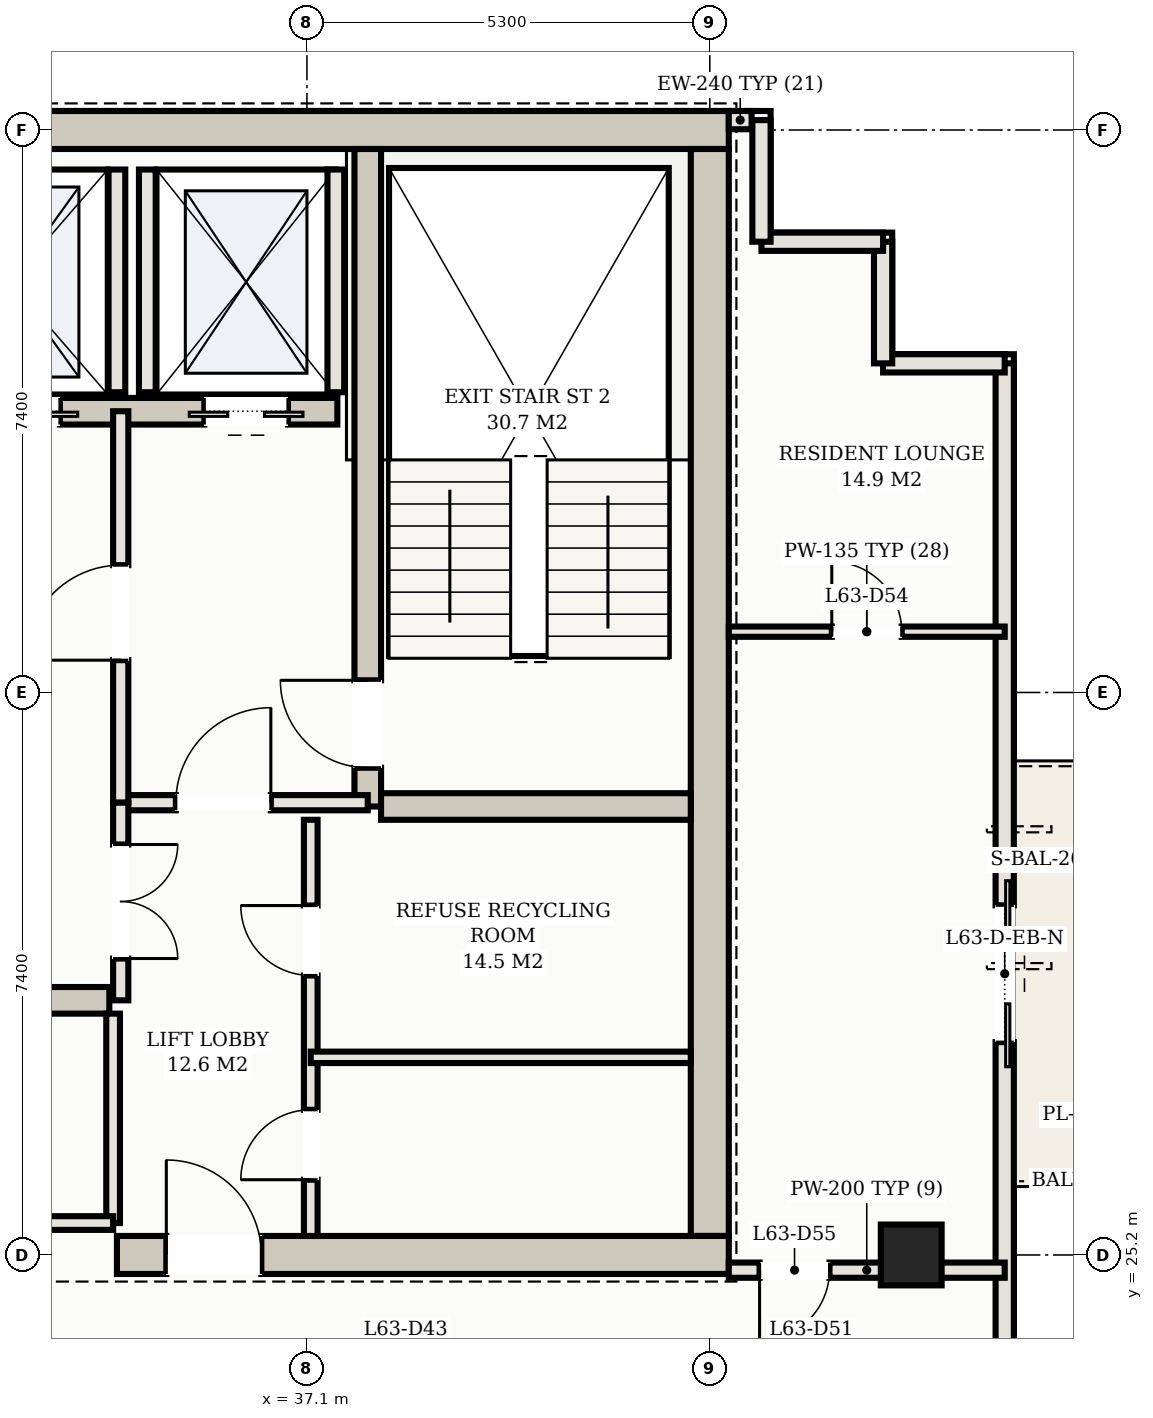
"""IFC4 building model, lengths in metres.
Left out: names, types, materials, properties, quantities, classifications, styles, units other than length and angle.
Written with IfcOpenShell. Run it as: python <this file> out.ifc"""

import sys

from ifc_helpers import new_model, si_unit, direction, frame, frame_2d, origin, origin_2d, place, context, subcontext, project, spatial, rectangle, hollow_rectangle, extrude, element, fill, save


model = new_model("IFC4")
c1 = context("Model", 3, precision=1e-05, world=origin(), true_north=direction((0.0, 1.0)))
c2 = subcontext(c1, "Body", "Model", "MODEL_VIEW")
j1 = project(units=[si_unit("LENGTHUNIT", "METRE"), si_unit("PLANEANGLEUNIT", "RADIAN")], contexts=[c1])
p1 = place(None, origin())
s1 = spatial("IfcSite", under=j1, at=p1, CompositionType="ELEMENT")
p2 = place(p1, origin())
s2 = spatial("IfcBuilding", under=s1, at=p2, CompositionType="ELEMENT")
p3 = place(p2, frame((0.0, 0.0, 229.7)))
s3 = spatial("IfcBuildingStorey", under=s2, at=p3, CompositionType="ELEMENT", Elevation=229.7)
p4 = place(p3, frame((10.35, 40.0, 0.0), z_axis=(0.0, 0.0, 1.0), x_axis=(1.0, 0.0, 0.0)))
e1 = element("IfcWall", 1, at=p4, inside=s3, PredefinedType="SHEAR", context=c2, shape_type="SweptSolid", body=[
    extrude(rectangle(XDim=32.3, YDim=0.5, at=frame_2d((16.15, 0.0))), origin(), (0.0, 0.0, 1.0), 3.11),
])
p5 = place(p3, frame((42.4, 25.45, 0.0), z_axis=(0.0, 0.0, 1.0), x_axis=(0.0, 1.0, 0.0)))
e2 = element("IfcWall", 2, at=p5, inside=s3, PredefinedType="SHEAR", context=c2, shape_type="SweptSolid", body=[
    extrude(rectangle(XDim=14.3, YDim=0.5, at=frame_2d((7.15, 0.0))), origin(), (0.0, 0.0, 1.0), 3.11),
])
p6 = place(p3, frame((34.6, 25.2, 0.0), z_axis=(0.0, 0.0, 1.0), x_axis=(1.0, 0.0, 0.0)))
e3 = element("IfcWall", 3, at=p6, inside=s3, PredefinedType="SHEAR", context=c2, shape_type="SweptSolid", body=[
    extrude(rectangle(XDim=8.05, YDim=0.5, at=frame_2d((4.025, 0.0))), origin(), (0.0, 0.0, 1.0), 3.11),
])
p7 = place(p6, frame((0.65, 0.0, 0.0)))
e4 = element("IfcOpeningElement", 4, at=p7, cuts=e3, PredefinedType="OPENING", context=c2, shape_type="SweptSolid", body=[
    extrude(rectangle(XDim=1.25, YDim=2.2, at=frame_2d((0.625, 1.1))), frame((0.0, 0.26, 0.0), z_axis=(0.0, -1.0, 0.0), x_axis=(1.0, 0.0, 0.0)), (0.0, 0.0, 1.0), 0.52),
])
p8 = place(p3, frame((37.9, 31.1, 0.0), z_axis=(0.0, 0.0, 1.0), x_axis=(0.0, 1.0, 0.0)))
e5 = element("IfcWall", 5, at=p8, inside=s3, PredefinedType="SHEAR", context=c2, shape_type="SweptSolid", body=[
    extrude(rectangle(XDim=8.65, YDim=0.35, at=frame_2d((4.325, 0.0))), origin(), (0.0, 0.0, 1.0), 3.11),
])
p9 = place(p8, frame((0.51, 0.0, 0.0)))
e6 = element("IfcOpeningElement", 6, at=p9, cuts=e5, PredefinedType="OPENING", context=c2, shape_type="SweptSolid", body=[
    extrude(rectangle(XDim=1.15, YDim=2.2, at=frame_2d((0.575, 1.1))), frame((0.0, 0.185, 0.0), z_axis=(0.0, -1.0, 0.0), x_axis=(1.0, 0.0, 0.0)), (0.0, 0.0, 1.0), 0.37),
])
p10 = place(p3, frame((38.075, 31.1, 0.0), z_axis=(0.0, 0.0, 1.0), x_axis=(1.0, 0.0, 0.0)))
e7 = element("IfcWall", 7, at=p10, inside=s3, PredefinedType="SHEAR", context=c2, shape_type="SweptSolid", body=[
    extrude(rectangle(XDim=4.075, YDim=0.35, at=frame_2d((2.038, 0.0))), origin(), (0.0, 0.0, 1.0), 3.11),
])
p11 = place(p3, frame((15.5, 36.3, 0.0), z_axis=(0.0, 0.0, 1.0), x_axis=(1.0, 0.0, 0.0)))
e8 = element("IfcWall", 8, at=p11, inside=s3, PredefinedType="SHEAR", context=c2, shape_type="SweptSolid", body=[
    extrude(rectangle(XDim=22.0, YDim=0.35, at=frame_2d((11.0, 0.0))), origin(), (0.0, 0.0, 1.0), 3.11),
])
p12 = place(p11, frame((0.65, 0.0, 0.0)))
e9 = element("IfcOpeningElement", 9, at=p12, cuts=e8, PredefinedType="OPENING", context=c2, shape_type="SweptSolid", body=[
    extrude(rectangle(XDim=1.1, YDim=2.15, at=frame_2d((0.55, 1.075))), frame((0.0, 0.185, 0.0), z_axis=(0.0, -1.0, 0.0), x_axis=(1.0, 0.0, 0.0)), (0.0, 0.0, 1.0), 0.37),
])
p13 = place(p11, frame((20.25, 0.0, 0.0)))
e10 = element("IfcOpeningElement", 10, at=p13, cuts=e8, PredefinedType="OPENING", context=c2, shape_type="SweptSolid", body=[
    extrude(rectangle(XDim=1.1, YDim=2.15, at=frame_2d((0.55, 1.075))), frame((0.0, 0.185, 0.0), z_axis=(0.0, -1.0, 0.0), x_axis=(1.0, 0.0, 0.0)), (0.0, 0.0, 1.0), 0.37),
])
p14 = place(p11, frame((17.05, 0.0, 0.0)))
e11 = element("IfcOpeningElement", 11, at=p14, cuts=e8, PredefinedType="OPENING", context=c2, shape_type="SweptSolid", body=[
    extrude(rectangle(XDim=1.3, YDim=2.2, at=frame_2d((0.65, 1.1))), frame((0.0, 0.185, 0.0), z_axis=(0.0, -1.0, 0.0), x_axis=(1.0, 0.0, 0.0)), (0.0, 0.0, 1.0), 0.37),
])
p15 = place(p11, frame((3.95, 0.0, 0.0)))
e12 = element("IfcOpeningElement", 12, at=p15, cuts=e8, PredefinedType="OPENING", context=c2, shape_type="SweptSolid", body=[
    extrude(rectangle(XDim=1.1, YDim=2.15, at=frame_2d((0.55, 1.075))), frame((0.0, 0.185, 0.0), z_axis=(0.0, -1.0, 0.0), x_axis=(1.0, 0.0, 0.0)), (0.0, 0.0, 1.0), 0.37),
])
p16 = place(p11, frame((6.55, 0.0, 0.0)))
e13 = element("IfcOpeningElement", 13, at=p16, cuts=e8, PredefinedType="OPENING", context=c2, shape_type="SweptSolid", body=[
    extrude(rectangle(XDim=1.1, YDim=2.15, at=frame_2d((0.55, 1.075))), frame((0.0, 0.185, 0.0), z_axis=(0.0, -1.0, 0.0), x_axis=(1.0, 0.0, 0.0)), (0.0, 0.0, 1.0), 0.37),
])
p17 = place(p11, frame((9.15, 0.0, 0.0)))
e14 = element("IfcOpeningElement", 14, at=p17, cuts=e8, PredefinedType="OPENING", context=c2, shape_type="SweptSolid", body=[
    extrude(rectangle(XDim=1.1, YDim=2.15, at=frame_2d((0.55, 1.075))), frame((0.0, 0.185, 0.0), z_axis=(0.0, -1.0, 0.0), x_axis=(1.0, 0.0, 0.0)), (0.0, 0.0, 1.0), 0.37),
])
p18 = place(p3, frame((18.5, 28.55, 0.0), z_axis=(0.0, 0.0, 1.0), x_axis=(1.0, 0.0, 0.0)))
e15 = element("IfcWall", 15, at=p18, inside=s3, PredefinedType="SHEAR", context=c2, shape_type="SweptSolid", body=[
    extrude(rectangle(XDim=16.0, YDim=0.35, at=frame_2d((8.0, 0.0))), origin(), (0.0, 0.0, 1.0), 3.11),
])
p19 = place(p3, frame((45.05, 25.2, 0.0), z_axis=(0.0, 0.0, 1.0), x_axis=(1.0, 0.0, 0.0)))
e16 = element("IfcColumn", 16, at=p19, inside=s3, PredefinedType="COLUMN", context=c2, shape_type="SweptSolid", body=[
    extrude(hollow_rectangle(XDim=0.8, YDim=0.8, WallThickness=0.028, at=origin_2d()), origin(), (0.0, 0.0, 1.0), 3.264),
])
for number, where, z_axis, x_axis in (
    (17, (35.0, 36.55, 0.0), (0.0, 0.0, 1.0), (0.0, 1.0, 0.0)),
    (18, (37.48, 36.55, 0.0), (0.0, 0.0, 1.0), (0.0, 1.0, 0.0)),
    (19, (34.6, 36.55, 0.0), (0.0, 0.0, 1.0), (0.0, 1.0, 0.0)),
):
    element("IfcWall", number, at=place(p3, frame(where, z_axis=z_axis, x_axis=x_axis)), inside=s3, PredefinedType="SOLIDWALL", context=c2, shape_type="SweptSolid", body=[
        extrude(rectangle(XDim=2.93, YDim=0.22, at=frame_2d((1.465, 0.0))), origin(), (0.0, 0.0, 1.0), 3.11),
    ])
p20 = place(p3, frame((46.28, 10.52, 0.0), z_axis=(0.0, 0.0, 1.0), x_axis=(0.0, 1.0, 0.0)))
e20 = element("IfcWall", 20, at=p20, inside=s3, PredefinedType="SOLIDWALL", context=c2, shape_type="SweptSolid", body=[
    extrude(rectangle(XDim=26.41, YDim=0.24, at=frame_2d((13.205, 0.0))), origin(), (0.0, 0.0, 1.0), 3.11),
])
p21 = place(p20, frame((17.48, 0.0, 0.0)))
e21 = element("IfcOpeningElement", 21, at=p21, cuts=e20, PredefinedType="OPENING", context=c2, shape_type="SweptSolid", body=[
    extrude(rectangle(XDim=1.8, YDim=2.2, at=frame_2d((0.9, 1.1))), frame((0.0, 0.13, 0.0), z_axis=(0.0, -1.0, 0.0), x_axis=(1.0, 0.0, 0.0)), (0.0, 0.0, 1.0), 0.26),
])
for number, where, z_axis, x_axis in (
    (22, (46.28, 36.93, 0.0), (0.0, 0.0, 1.0), (-1.0, 0.0, 0.0)),
    (23, (44.68, 36.93, 0.0), (0.0, 0.0, 1.0), (0.0, 1.0, 0.0)),
):
    element("IfcWall", number, at=place(p3, frame(where, z_axis=z_axis, x_axis=x_axis)), inside=s3, PredefinedType="SOLIDWALL", context=c2, shape_type="SweptSolid", body=[
        extrude(rectangle(XDim=1.6, YDim=0.24, at=frame_2d((0.8, 0.0))), origin(), (0.0, 0.0, 1.0), 3.11),
    ])
for number, where, z_axis, x_axis in (
    (24, (44.68, 38.53, 0.0), (0.0, 0.0, 1.0), (-1.0, 0.0, 0.0)),
    (25, (43.08, 38.53, 0.0), (0.0, 0.0, 1.0), (0.0, 1.0, 0.0)),
):
    element("IfcWall", number, at=place(p3, frame(where, z_axis=z_axis, x_axis=x_axis)), inside=s3, PredefinedType="SOLIDWALL", context=c2, shape_type="SweptSolid", body=[
        extrude(rectangle(XDim=1.6, YDim=0.24, at=frame_2d((0.8, 0.0))), origin(), (0.0, 0.0, 1.0), 3.11),
    ])
p22 = place(p3, frame((42.95, 40.13, 0.0), z_axis=(0.0, 0.0, 1.0), x_axis=(-1.0, 0.0, 0.0)))
e26 = element("IfcWall", 26, at=p22, inside=s3, PredefinedType="SOLIDWALL", context=c2, shape_type="SweptSolid", body=[
    extrude(rectangle(XDim=0.3, YDim=0.24, at=frame_2d((0.15, 0.0))), origin(), (0.0, 0.0, 1.0), 3.11),
])
p23 = place(p3, frame((34.65, 31.15, 0.0), z_axis=(0.0, 0.0, 1.0), x_axis=(1.0, 0.0, 0.0)))
e27 = element("IfcWall", 27, at=p23, inside=s3, PredefinedType="PARTITIONING", context=c2, shape_type="SweptSolid", body=[
    extrude(rectangle(XDim=3.25, YDim=0.2, at=frame_2d((1.625, 0.0))), origin(), (0.0, 0.0, 1.0), 2.43),
])
p24 = place(p23, frame((0.725, 0.0, 0.0)))
e28 = element("IfcOpeningElement", 28, at=p24, cuts=e27, PredefinedType="OPENING", context=c2, shape_type="SweptSolid", body=[
    extrude(rectangle(XDim=1.25, YDim=2.2, at=frame_2d((0.625, 1.1))), frame((0.0, 0.11, 0.0), z_axis=(0.0, -1.0, 0.0), x_axis=(1.0, 0.0, 0.0)), (0.0, 0.0, 1.0), 0.22),
])
p25 = place(p3, frame((34.65, 31.15, 0.0), z_axis=(0.0, 0.0, 1.0), x_axis=(0.0, 1.0, 0.0)))
e29 = element("IfcWall", 29, at=p25, inside=s3, PredefinedType="PARTITIONING", context=c2, shape_type="SweptSolid", body=[
    extrude(rectangle(XDim=5.15, YDim=0.2, at=frame_2d((2.575, 0.0))), origin(), (0.0, 0.0, 1.0), 2.43),
])
p26 = place(p25, frame((1.875, 0.0, 0.0)))
e30 = element("IfcOpeningElement", 30, at=p26, cuts=e29, PredefinedType="OPENING", context=c2, shape_type="SweptSolid", body=[
    extrude(rectangle(XDim=1.25, YDim=2.2, at=frame_2d((0.625, 1.1))), frame((0.0, 0.11, 0.0), z_axis=(0.0, -1.0, 0.0), x_axis=(1.0, 0.0, 0.0)), (0.0, 0.0, 1.0), 0.22),
])
p27 = place(p3, frame((37.15, 25.45, 0.0), z_axis=(0.0, 0.0, 1.0), x_axis=(0.0, 1.0, 0.0)))
e31 = element("IfcWall", 31, at=p27, inside=s3, PredefinedType="PARTITIONING", context=c2, shape_type="SweptSolid", body=[
    extrude(rectangle(XDim=5.475, YDim=0.18, at=frame_2d((2.738, 0.0))), origin(), (0.0, 0.0, 1.0), 2.43),
])
p28 = place(p27, frame((0.74, 0.0, 0.0)))
e32 = element("IfcOpeningElement", 32, at=p28, cuts=e31, PredefinedType="OPENING", context=c2, shape_type="SweptSolid", body=[
    extrude(rectangle(XDim=0.92, YDim=2.15, at=frame_2d((0.46, 1.075))), frame((0.0, 0.1, 0.0), z_axis=(0.0, -1.0, 0.0), x_axis=(1.0, 0.0, 0.0)), (0.0, 0.0, 1.0), 0.2),
])
p29 = place(p27, frame((3.427, 0.0, 0.0)))
e33 = element("IfcOpeningElement", 33, at=p29, cuts=e31, PredefinedType="OPENING", context=c2, shape_type="SweptSolid", body=[
    extrude(rectangle(XDim=0.92, YDim=2.15, at=frame_2d((0.46, 1.075))), frame((0.0, 0.1, 0.0), z_axis=(0.0, -1.0, 0.0), x_axis=(1.0, 0.0, 0.0)), (0.0, 0.0, 1.0), 0.2),
])
p30 = place(p3, frame((37.15, 27.8, 0.0), z_axis=(0.0, 0.0, 1.0), x_axis=(1.0, 0.0, 0.0)))
e34 = element("IfcWall", 34, at=p30, inside=s3, PredefinedType="PARTITIONING", context=c2, shape_type="SweptSolid", body=[
    extrude(rectangle(XDim=5.0, YDim=0.15, at=frame_2d((2.5, 0.0))), origin(), (0.0, 0.0, 1.0), 2.43),
])
p31 = place(p3, frame((34.65, 28.55, 0.0), z_axis=(0.0, 0.0, 1.0), x_axis=(0.0, 1.0, 0.0)))
e35 = element("IfcWall", 35, at=p31, inside=s3, PredefinedType="PARTITIONING", context=c2, shape_type="SweptSolid", body=[
    extrude(rectangle(XDim=2.6, YDim=0.2, at=frame_2d((1.3, 0.0))), origin(), (0.0, 0.0, 1.0), 2.43),
])
p32 = place(p31, frame((0.55, 0.0, 0.0)))
e36 = element("IfcOpeningElement", 36, at=p32, cuts=e35, PredefinedType="OPENING", context=c2, shape_type="SweptSolid", body=[
    extrude(rectangle(XDim=1.5, YDim=2.25, at=frame_2d((0.75, 1.125))), frame((0.0, 0.11, 0.0), z_axis=(0.0, -1.0, 0.0), x_axis=(1.0, 0.0, 0.0)), (0.0, 0.0, 1.0), 0.22),
])
p33 = place(p3, frame((34.55, 25.62, 0.0), z_axis=(0.0, 0.0, 1.0), x_axis=(0.0, 1.0, 0.0)))
e37 = element("IfcWall", 37, at=p33, inside=s3, PredefinedType="PARTITIONING", context=c2, shape_type="SweptSolid", body=[
    extrude(rectangle(XDim=2.755, YDim=0.18, at=frame_2d((1.377, 0.0))), origin(), (0.0, 0.0, 1.0), 2.43),
])
p34 = place(p3, frame((26.65, 25.62, 0.0), z_axis=(0.0, 0.0, 1.0), x_axis=(1.0, 0.0, 0.0)))
e38 = element("IfcWall", 38, at=p34, inside=s3, PredefinedType="PARTITIONING", context=c2, shape_type="SweptSolid", body=[
    extrude(rectangle(XDim=7.9, YDim=0.18, at=frame_2d((3.95, 0.0))), origin(), (0.0, 0.0, 1.0), 2.43),
])
p35 = place(p34, frame((3.34, 0.0, 0.0)))
e39 = element("IfcOpeningElement", 39, at=p35, cuts=e38, PredefinedType="OPENING", context=c2, shape_type="SweptSolid", body=[
    extrude(rectangle(XDim=0.92, YDim=2.15, at=frame_2d((0.46, 1.075))), frame((0.0, 0.1, 0.0), z_axis=(0.0, -1.0, 0.0), x_axis=(1.0, 0.0, 0.0)), (0.0, 0.0, 1.0), 0.2),
])
p36 = place(p3, frame((42.65, 25.0, 0.0), z_axis=(0.0, 0.0, 1.0), x_axis=(1.0, 0.0, 0.0)))
e40 = element("IfcWall", 40, at=p36, inside=s3, PredefinedType="PARTITIONING", context=c2, shape_type="SweptSolid", body=[
    extrude(rectangle(XDim=3.63, YDim=0.2, at=frame_2d((1.815, 0.0))), origin(), (0.0, 0.0, 1.0), 2.43),
])
p37 = place(p36, frame((0.405, 0.0, 0.0)))
e41 = element("IfcOpeningElement", 41, at=p37, cuts=e40, PredefinedType="OPENING", context=c2, shape_type="SweptSolid", body=[
    extrude(rectangle(XDim=0.92, YDim=2.15, at=frame_2d((0.46, 1.075))), frame((0.0, 0.11, 0.0), z_axis=(0.0, -1.0, 0.0), x_axis=(1.0, 0.0, 0.0)), (0.0, 0.0, 1.0), 0.22),
])
p38 = place(p3, frame((42.65, 33.4, 0.0), z_axis=(0.0, 0.0, 1.0), x_axis=(1.0, 0.0, 0.0)))
e42 = element("IfcWall", 42, at=p38, inside=s3, PredefinedType="PARTITIONING", context=c2, shape_type="SweptSolid", body=[
    extrude(rectangle(XDim=3.63, YDim=0.135, at=frame_2d((1.815, 0.0))), origin(), (0.0, 0.0, 1.0), 2.43),
])
p39 = place(p38, frame((1.355, 0.0, 0.0)))
e43 = element("IfcOpeningElement", 43, at=p39, cuts=e42, PredefinedType="OPENING", context=c2, shape_type="SweptSolid", body=[
    extrude(rectangle(XDim=0.92, YDim=2.15, at=frame_2d((0.46, 1.075))), frame((0.0, 0.078, 0.0), z_axis=(0.0, -1.0, 0.0), x_axis=(1.0, 0.0, 0.0)), (0.0, 0.0, 1.0), 0.155),
])
p40 = place(p13, frame((1.1, 0.0, 0.0), z_axis=(0.0, 0.0, 1.0), x_axis=(-1.0, 0.0, 0.0)))
e44 = element("IfcDoor", 44, at=p40, inside=s3, OperationType="DOUBLE_DOOR_SLIDING", PredefinedType="DOOR", context=c2, shape_type="SweptSolid", body=[
    extrude(rectangle(XDim=1.1, YDim=2.15, at=frame_2d((0.55, 1.075))), frame((0.0, 0.025, 0.0), z_axis=(0.0, -1.0, 0.0), x_axis=(1.0, 0.0, 0.0)), (0.0, 0.0, 1.0), 0.05),
])
fill(e10, e44)
p41 = place(p14, frame((1.3, 0.0, 0.0), z_axis=(0.0, 0.0, 1.0), x_axis=(-1.0, 0.0, 0.0)))
e45 = element("IfcDoor", 45, at=p41, inside=s3, OperationType="DOUBLE_DOOR_SLIDING", PredefinedType="DOOR", context=c2, shape_type="SweptSolid", body=[
    extrude(rectangle(XDim=1.3, YDim=2.2, at=frame_2d((0.65, 1.1))), frame((0.0, 0.025, 0.0), z_axis=(0.0, -1.0, 0.0), x_axis=(1.0, 0.0, 0.0)), (0.0, 0.0, 1.0), 0.05),
])
fill(e11, e45)
p42 = place(p21, frame((1.8, 0.0, 0.0), z_axis=(0.0, 0.0, 1.0), x_axis=(-1.0, 0.0, 0.0)))
e46 = element("IfcDoor", 46, at=p42, inside=s3, OperationType="DOUBLE_DOOR_SLIDING", PredefinedType="DOOR", context=c2, shape_type="SweptSolid", body=[
    extrude(rectangle(XDim=1.8, YDim=2.2, at=frame_2d((0.9, 1.1))), frame((0.0, 0.025, 0.0), z_axis=(0.0, -1.0, 0.0), x_axis=(1.0, 0.0, 0.0)), (0.0, 0.0, 1.0), 0.05),
])
fill(e21, e46)
p43 = place(p7, origin())
e47 = element("IfcDoor", 47, at=p43, inside=s3, OperationType="SINGLE_SWING_LEFT", PredefinedType="DOOR", context=c2, shape_type="SweptSolid", body=[
    extrude(rectangle(XDim=1.25, YDim=2.2, at=frame_2d((0.625, 1.1))), frame((0.0, 0.025, 0.0), z_axis=(0.0, -1.0, 0.0), x_axis=(1.0, 0.0, 0.0)), (0.0, 0.0, 1.0), 0.05),
])
fill(e4, e47)
p44 = place(p24, origin())
e48 = element("IfcDoor", 48, at=p44, inside=s3, OperationType="SINGLE_SWING_RIGHT", PredefinedType="DOOR", context=c2, shape_type="SweptSolid", body=[
    extrude(rectangle(XDim=1.25, YDim=2.2, at=frame_2d((0.625, 1.1))), frame((0.0, 0.025, 0.0), z_axis=(0.0, -1.0, 0.0), x_axis=(1.0, 0.0, 0.0)), (0.0, 0.0, 1.0), 0.05),
])
fill(e28, e48)
p45 = place(p26, origin())
e49 = element("IfcDoor", 49, at=p45, inside=s3, OperationType="SINGLE_SWING_LEFT", PredefinedType="DOOR", context=c2, shape_type="SweptSolid", body=[
    extrude(rectangle(XDim=1.25, YDim=2.2, at=frame_2d((0.625, 1.1))), frame((0.0, 0.025, 0.0), z_axis=(0.0, -1.0, 0.0), x_axis=(1.0, 0.0, 0.0)), (0.0, 0.0, 1.0), 0.05),
])
fill(e30, e49)
p46 = place(p9, origin())
e50 = element("IfcDoor", 50, at=p46, inside=s3, OperationType="SINGLE_SWING_RIGHT", PredefinedType="DOOR", context=c2, shape_type="SweptSolid", body=[
    extrude(rectangle(XDim=1.15, YDim=2.2, at=frame_2d((0.575, 1.1))), frame((0.0, 0.025, 0.0), z_axis=(0.0, -1.0, 0.0), x_axis=(1.0, 0.0, 0.0)), (0.0, 0.0, 1.0), 0.05),
])
fill(e6, e50)
p47 = place(p28, origin())
e51 = element("IfcDoor", 51, at=p47, inside=s3, OperationType="SINGLE_SWING_LEFT", PredefinedType="DOOR", context=c2, shape_type="SweptSolid", body=[
    extrude(rectangle(XDim=0.92, YDim=2.15, at=frame_2d((0.46, 1.075))), frame((0.0, 0.025, 0.0), z_axis=(0.0, -1.0, 0.0), x_axis=(1.0, 0.0, 0.0)), (0.0, 0.0, 1.0), 0.05),
])
fill(e32, e51)
p48 = place(p29, origin())
e52 = element("IfcDoor", 52, at=p48, inside=s3, OperationType="SINGLE_SWING_RIGHT", PredefinedType="DOOR", context=c2, shape_type="SweptSolid", body=[
    extrude(rectangle(XDim=0.92, YDim=2.15, at=frame_2d((0.46, 1.075))), frame((0.0, 0.025, 0.0), z_axis=(0.0, -1.0, 0.0), x_axis=(1.0, 0.0, 0.0)), (0.0, 0.0, 1.0), 0.05),
])
fill(e33, e52)
p49 = place(p32, frame((1.5, 0.0, 0.0), z_axis=(0.0, 0.0, 1.0), x_axis=(-1.0, 0.0, 0.0)))
e53 = element("IfcDoor", 53, at=p49, inside=s3, OperationType="DOUBLE_DOOR_SINGLE_SWING", PredefinedType="DOOR", context=c2, shape_type="SweptSolid", body=[
    extrude(rectangle(XDim=1.5, YDim=2.25, at=frame_2d((0.75, 1.125))), frame((0.0, 0.025, 0.0), z_axis=(0.0, -1.0, 0.0), x_axis=(1.0, 0.0, 0.0)), (0.0, 0.0, 1.0), 0.05),
])
fill(e36, e53)
p50 = place(p39, origin())
e54 = element("IfcDoor", 54, at=p50, inside=s3, OperationType="SINGLE_SWING_LEFT", PredefinedType="DOOR", context=c2, shape_type="SweptSolid", body=[
    extrude(rectangle(XDim=0.92, YDim=2.15, at=frame_2d((0.46, 1.075))), frame((0.0, 0.025, 0.0), z_axis=(0.0, -1.0, 0.0), x_axis=(1.0, 0.0, 0.0)), (0.0, 0.0, 1.0), 0.05),
])
fill(e43, e54)
p51 = place(p37, frame((0.92, 0.0, 0.0), z_axis=(0.0, 0.0, 1.0), x_axis=(-1.0, 0.0, 0.0)))
e55 = element("IfcDoor", 55, at=p51, inside=s3, OperationType="SINGLE_SWING_RIGHT", PredefinedType="DOOR", context=c2, shape_type="SweptSolid", body=[
    extrude(rectangle(XDim=0.92, YDim=2.15, at=frame_2d((0.46, 1.075))), frame((0.0, 0.025, 0.0), z_axis=(0.0, -1.0, 0.0), x_axis=(1.0, 0.0, 0.0)), (0.0, 0.0, 1.0), 0.05),
])
fill(e41, e55)
save(model, sys.argv[1])
